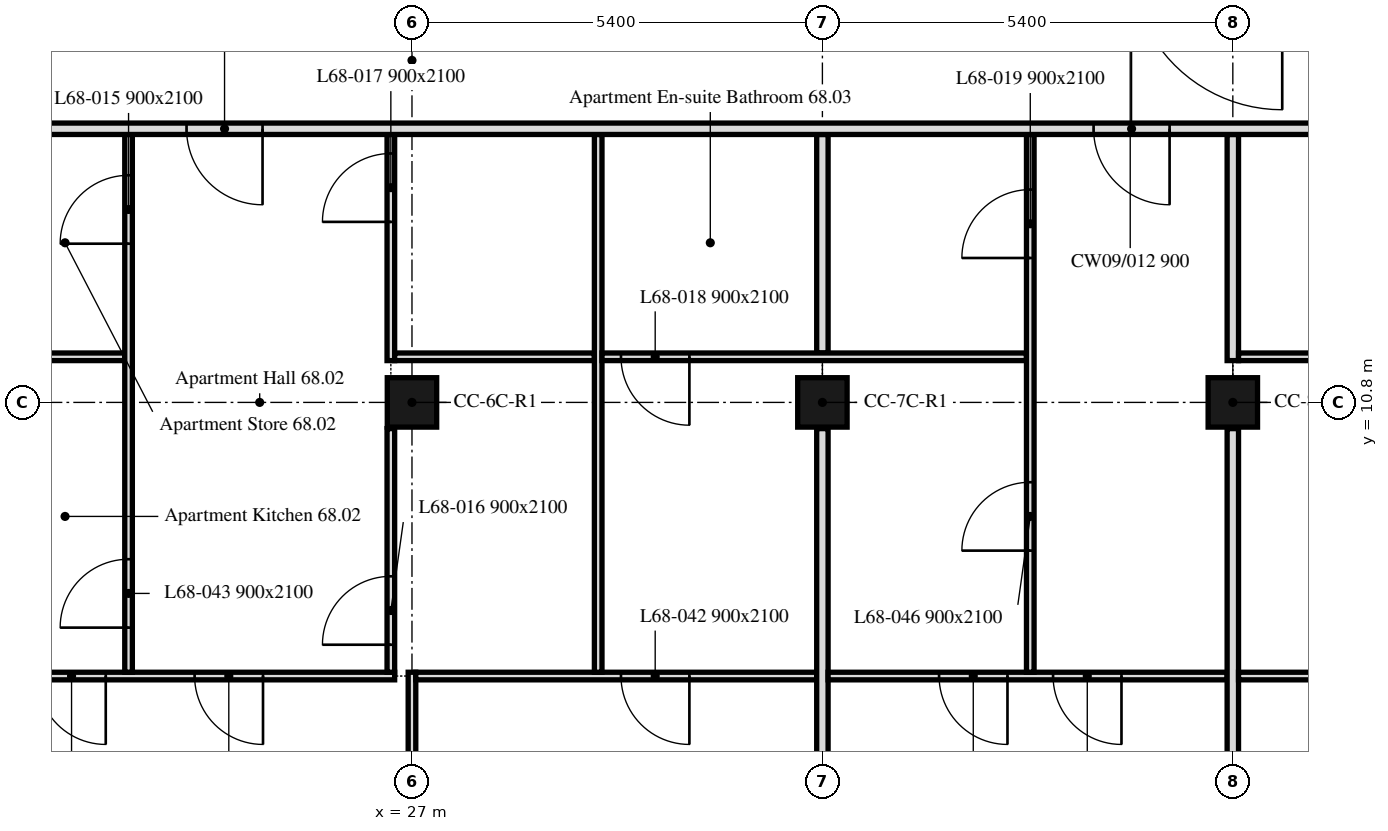
"""IFC4 building model, lengths in metres.
Left out: names, types, materials, properties, quantities, classifications, styles, units other than length and angle.
Written with IfcOpenShell. Run it as: python <this file> out.ifc"""

import sys

from ifc_helpers import new_model, si_unit, direction, frame, frame_2d, origin, origin_2d, place, context, subcontext, project, spatial, rectangle, extrude, element, fill, save


model = new_model("IFC4")
c1 = context("Model", 3, precision=1e-05, world=origin(), true_north=direction((0.0, 1.0)))
c2 = subcontext(c1, "Body", "Model", "MODEL_VIEW")
j1 = project(units=[si_unit("LENGTHUNIT", "METRE"), si_unit("PLANEANGLEUNIT", "RADIAN")], contexts=[c1])
p1 = place(None, origin())
s1 = spatial("IfcSite", under=j1, at=p1, CompositionType="ELEMENT")
p2 = place(p1, origin())
s2 = spatial("IfcBuilding", under=s1, at=p2, CompositionType="ELEMENT")
p3 = place(p2, frame((0.0, 0.0, 278.5)))
s3 = spatial("IfcBuildingStorey", under=s2, at=p3, CompositionType="ELEMENT", Elevation=278.5)
for number, where, z_axis, x_axis in (
    (1, (27.0, 10.8, 0.0), (0.0, 0.0, 1.0), (1.0, 0.0, 0.0)),
    (2, (32.4, 10.8, 0.0), (0.0, 0.0, 1.0), (1.0, 0.0, 0.0)),
    (3, (37.8, 10.8, 0.0), (0.0, 0.0, 1.0), (1.0, 0.0, 0.0)),
):
    element("IfcColumn", number, at=place(p3, frame(where, z_axis=z_axis, x_axis=x_axis)), inside=s3, PredefinedType="COLUMN", context=c2, shape_type="SweptSolid", body=[
        extrude(rectangle(XDim=0.65, YDim=0.65, at=origin_2d()), origin(), (0.0, 0.0, 1.0), 3.0),
    ])
p4 = place(p3, frame((27.0, 5.745, 0.0), z_axis=(0.0, 0.0, 1.0), x_axis=(0.0, 1.0, 0.0)))
e4 = element("IfcWall", 4, at=p4, inside=s3, PredefinedType="PARTITIONING", context=c2, shape_type="SweptSolid", body=[
    extrude(rectangle(XDim=1.505, YDim=0.1, at=frame_2d((0.752, 0.0))), origin(), (0.0, 0.0, 1.0), 2.4),
])
p5 = place(p3, frame((26.772, 7.2, 0.0), z_axis=(0.0, 0.0, 1.0), x_axis=(-1.0, 0.0, 0.0)))
e5 = element("IfcWall", 5, at=p5, inside=s3, PredefinedType="PARTITIONING", context=c2, shape_type="SweptSolid", body=[
    extrude(rectangle(XDim=5.097, YDim=0.1, at=frame_2d((2.548, 0.0))), origin(), (0.0, 0.0, 1.0), 3.0),
])
p6 = place(p5, frame((3.801, 0.0, 0.0)))
e6 = element("IfcOpeningElement", 6, at=p6, cuts=e5, PredefinedType="OPENING", context=c2, shape_type="SweptSolid", body=[
    extrude(rectangle(XDim=0.9, YDim=2.1, at=frame_2d((0.45, 1.05))), frame((0.0, 0.05, 0.0), z_axis=(0.0, -1.0, 0.0), x_axis=(1.0, 0.0, 0.0)), (0.0, 0.0, 1.0), 0.1),
])
p7 = place(p5, frame((1.732, 0.0, 0.0)))
e7 = element("IfcOpeningElement", 7, at=p7, cuts=e5, PredefinedType="OPENING", context=c2, shape_type="SweptSolid", body=[
    extrude(rectangle(XDim=0.9, YDim=2.1, at=frame_2d((0.45, 1.05))), frame((0.0, 0.05, 0.0), z_axis=(0.0, -1.0, 0.0), x_axis=(1.0, 0.0, 0.0)), (0.0, 0.0, 1.0), 0.1),
])
p8 = place(p3, frame((32.325, 7.2, 0.0), z_axis=(0.0, 0.0, 1.0), x_axis=(-1.0, 0.0, 0.0)))
e8 = element("IfcWall", 8, at=p8, inside=s3, PredefinedType="PARTITIONING", context=c2, shape_type="SweptSolid", body=[
    extrude(rectangle(XDim=5.275, YDim=0.1, at=frame_2d((2.637, 0.0))), origin(), (0.0, 0.0, 1.0), 3.0),
])
p9 = place(p8, frame((1.675, 0.0, 0.0)))
e9 = element("IfcOpeningElement", 9, at=p9, cuts=e8, PredefinedType="OPENING", context=c2, shape_type="SweptSolid", body=[
    extrude(rectangle(XDim=0.9, YDim=2.1, at=frame_2d((0.45, 1.05))), frame((0.0, 0.05, 0.0), z_axis=(0.0, -1.0, 0.0), x_axis=(1.0, 0.0, 0.0)), (0.0, 0.0, 1.0), 0.1),
])
p10 = place(p3, frame((23.221, 11.4, 0.0), z_axis=(0.0, 0.0, 1.0), x_axis=(-1.0, 0.0, 0.0)))
e10 = element("IfcWall", 10, at=p10, inside=s3, PredefinedType="PARTITIONING", context=c2, shape_type="SweptSolid", body=[
    extrude(rectangle(XDim=3.641, YDim=0.1, at=frame_2d((1.82, 0.0))), origin(), (0.0, 0.0, 1.0), 2.4),
])
p11 = place(p10, frame((2.491, 0.0, 0.0)))
e11 = element("IfcOpeningElement", 11, at=p11, cuts=e10, PredefinedType="OPENING", context=c2, shape_type="SweptSolid", body=[
    extrude(rectangle(XDim=0.9, YDim=2.1, at=frame_2d((0.45, 1.05))), frame((0.0, 0.05, 0.0), z_axis=(0.0, -1.0, 0.0), x_axis=(1.0, 0.0, 0.0)), (0.0, 0.0, 1.0), 0.1),
])
p12 = place(p3, frame((23.271, 7.25, 0.0), z_axis=(0.0, 0.0, 1.0), x_axis=(0.0, 1.0, 0.0)))
e12 = element("IfcWall", 12, at=p12, inside=s3, PredefinedType="PARTITIONING", context=c2, shape_type="SweptSolid", body=[
    extrude(rectangle(XDim=7.075, YDim=0.1, at=frame_2d((3.538, 0.0))), origin(), (0.0, 0.0, 1.0), 3.0),
])
p13 = place(p12, frame((5.638, 0.0, 0.0)))
e13 = element("IfcOpeningElement", 13, at=p13, cuts=e12, PredefinedType="OPENING", context=c2, shape_type="SweptSolid", body=[
    extrude(rectangle(XDim=0.9, YDim=2.1, at=frame_2d((0.45, 1.05))), frame((0.0, 0.05, 0.0), z_axis=(0.0, -1.0, 0.0), x_axis=(1.0, 0.0, 0.0)), (0.0, 0.0, 1.0), 0.1),
])
p14 = place(p12, frame((0.587, 0.0, 0.0)))
e14 = element("IfcOpeningElement", 14, at=p14, cuts=e12, PredefinedType="OPENING", context=c2, shape_type="SweptSolid", body=[
    extrude(rectangle(XDim=0.9, YDim=2.1, at=frame_2d((0.45, 1.05))), frame((0.0, 0.05, 0.0), z_axis=(0.0, -1.0, 0.0), x_axis=(1.0, 0.0, 0.0)), (0.0, 0.0, 1.0), 0.1),
])
p15 = place(p3, frame((26.722, 7.25, 0.0), z_axis=(0.0, 0.0, 1.0), x_axis=(0.0, 1.0, 0.0)))
e15 = element("IfcWall", 15, at=p15, inside=s3, PredefinedType="PARTITIONING", context=c2, shape_type="SweptSolid", body=[
    extrude(rectangle(XDim=3.205, YDim=0.1, at=frame_2d((1.603, 0.0))), origin(), (0.0, 0.0, 1.0), 3.0),
])
p16 = place(p15, frame((0.362, 0.0, 0.0)))
e16 = element("IfcOpeningElement", 16, at=p16, cuts=e15, PredefinedType="OPENING", context=c2, shape_type="SweptSolid", body=[
    extrude(rectangle(XDim=0.9, YDim=2.1, at=frame_2d((0.45, 1.05))), frame((0.0, 0.05, 0.0), z_axis=(0.0, -1.0, 0.0), x_axis=(1.0, 0.0, 0.0)), (0.0, 0.0, 1.0), 0.1),
])
p17 = place(p3, frame((26.722, 11.35, 0.0), z_axis=(0.0, 0.0, 1.0), x_axis=(0.0, 1.0, 0.0)))
e17 = element("IfcWall", 17, at=p17, inside=s3, PredefinedType="PARTITIONING", context=c2, shape_type="SweptSolid", body=[
    extrude(rectangle(XDim=2.975, YDim=0.1, at=frame_2d((1.487, 0.0))), origin(), (0.0, 0.0, 1.0), 3.0),
])
p18 = place(p17, frame((1.825, 0.0, 0.0)))
e18 = element("IfcOpeningElement", 18, at=p18, cuts=e17, PredefinedType="OPENING", context=c2, shape_type="SweptSolid", body=[
    extrude(rectangle(XDim=0.9, YDim=2.1, at=frame_2d((0.45, 1.05))), frame((0.0, 0.05, 0.0), z_axis=(0.0, -1.0, 0.0), x_axis=(1.0, 0.0, 0.0)), (0.0, 0.0, 1.0), 0.1),
])
p19 = place(p3, frame((29.4, 11.4, 0.0), z_axis=(0.0, 0.0, 1.0), x_axis=(-1.0, 0.0, 0.0)))
e19 = element("IfcWall", 19, at=p19, inside=s3, PredefinedType="PARTITIONING", context=c2, shape_type="SweptSolid", body=[
    extrude(rectangle(XDim=2.628, YDim=0.1, at=frame_2d((1.314, 0.0))), origin(), (0.0, 0.0, 1.0), 2.4),
])
p20 = place(p3, frame((29.45, 7.25, 0.0), z_axis=(0.0, 0.0, 1.0), x_axis=(0.0, 1.0, 0.0)))
e20 = element("IfcWall", 20, at=p20, inside=s3, PredefinedType="PARTITIONING", context=c2, shape_type="SweptSolid", body=[
    extrude(rectangle(XDim=7.075, YDim=0.1, at=frame_2d((3.538, 0.0))), origin(), (0.0, 0.0, 1.0), 3.0),
])
p21 = place(p3, frame((32.4, 5.745, 0.0), z_axis=(0.0, 0.0, 1.0), x_axis=(0.0, 1.0, 0.0)))
e21 = element("IfcWall", 21, at=p21, inside=s3, PredefinedType="PARTITIONING", context=c2, shape_type="SweptSolid", body=[
    extrude(rectangle(XDim=4.71, YDim=0.15, at=frame_2d((2.355, 0.0))), origin(), (0.0, 0.0, 1.0), 2.4),
])
p22 = place(p3, frame((32.4, 11.45, 0.0), z_axis=(0.0, 0.0, 1.0), x_axis=(0.0, 1.0, 0.0)))
e22 = element("IfcWall", 22, at=p22, inside=s3, PredefinedType="PARTITIONING", context=c2, shape_type="SweptSolid", body=[
    extrude(rectangle(XDim=2.875, YDim=0.15, at=frame_2d((1.438, 0.0))), origin(), (0.0, 0.0, 1.0), 2.4),
])
p23 = place(p3, frame((37.725, 7.2, 0.0), z_axis=(0.0, 0.0, 1.0), x_axis=(-1.0, 0.0, 0.0)))
e23 = element("IfcWall", 23, at=p23, inside=s3, PredefinedType="PARTITIONING", context=c2, shape_type="SweptSolid", body=[
    extrude(rectangle(XDim=5.25, YDim=0.1, at=frame_2d((2.625, 0.0))), origin(), (0.0, 0.0, 1.0), 3.0),
])
p24 = place(p23, frame((2.89, 0.0, 0.0)))
e24 = element("IfcOpeningElement", 24, at=p24, cuts=e23, PredefinedType="OPENING", context=c2, shape_type="SweptSolid", body=[
    extrude(rectangle(XDim=0.9, YDim=2.1, at=frame_2d((0.45, 1.05))), frame((0.0, 0.05, 0.0), z_axis=(0.0, -1.0, 0.0), x_axis=(1.0, 0.0, 0.0)), (0.0, 0.0, 1.0), 0.1),
])
p25 = place(p23, frame((1.39, 0.0, 0.0)))
e25 = element("IfcOpeningElement", 25, at=p25, cuts=e23, PredefinedType="OPENING", context=c2, shape_type="SweptSolid", body=[
    extrude(rectangle(XDim=0.9, YDim=2.1, at=frame_2d((0.45, 1.05))), frame((0.0, 0.05, 0.0), z_axis=(0.0, -1.0, 0.0), x_axis=(1.0, 0.0, 0.0)), (0.0, 0.0, 1.0), 0.1),
])
p26 = place(p3, frame((35.085, 11.4, 0.0), z_axis=(0.0, 0.0, 1.0), x_axis=(-1.0, 0.0, 0.0)))
e26 = element("IfcWall", 26, at=p26, inside=s3, PredefinedType="PARTITIONING", context=c2, shape_type="SweptSolid", body=[
    extrude(rectangle(XDim=5.585, YDim=0.1, at=frame_2d((2.792, 0.0))), origin(), (0.0, 0.0, 1.0), 2.4),
])
p27 = place(p26, frame((4.435, 0.0, 0.0)))
e27 = element("IfcOpeningElement", 27, at=p27, cuts=e26, PredefinedType="OPENING", context=c2, shape_type="SweptSolid", body=[
    extrude(rectangle(XDim=0.9, YDim=2.1, at=frame_2d((0.45, 1.05))), frame((0.0, 0.05, 0.0), z_axis=(0.0, -1.0, 0.0), x_axis=(1.0, 0.0, 0.0)), (0.0, 0.0, 1.0), 0.1),
])
p28 = place(p3, frame((35.135, 7.25, 0.0), z_axis=(0.0, 0.0, 1.0), x_axis=(0.0, 1.0, 0.0)))
e28 = element("IfcWall", 28, at=p28, inside=s3, PredefinedType="PARTITIONING", context=c2, shape_type="SweptSolid", body=[
    extrude(rectangle(XDim=7.075, YDim=0.1, at=frame_2d((3.538, 0.0))), origin(), (0.0, 0.0, 1.0), 2.4),
])
p29 = place(p28, frame((5.45, 0.0, 0.0)))
e29 = element("IfcOpeningElement", 29, at=p29, cuts=e28, PredefinedType="OPENING", context=c2, shape_type="SweptSolid", body=[
    extrude(rectangle(XDim=0.9, YDim=2.1, at=frame_2d((0.45, 1.05))), frame((0.0, 0.05, 0.0), z_axis=(0.0, -1.0, 0.0), x_axis=(1.0, 0.0, 0.0)), (0.0, 0.0, 1.0), 0.1),
])
p30 = place(p28, frame((1.6, 0.0, 0.0)))
e30 = element("IfcOpeningElement", 30, at=p30, cuts=e28, PredefinedType="OPENING", context=c2, shape_type="SweptSolid", body=[
    extrude(rectangle(XDim=0.9, YDim=2.1, at=frame_2d((0.45, 1.05))), frame((0.0, 0.05, 0.0), z_axis=(0.0, -1.0, 0.0), x_axis=(1.0, 0.0, 0.0)), (0.0, 0.0, 1.0), 0.1),
])
p31 = place(p3, frame((37.8, 5.745, 0.0), z_axis=(0.0, 0.0, 1.0), x_axis=(0.0, 1.0, 0.0)))
e31 = element("IfcWall", 31, at=p31, inside=s3, PredefinedType="PARTITIONING", context=c2, shape_type="SweptSolid", body=[
    extrude(rectangle(XDim=4.71, YDim=0.15, at=frame_2d((2.355, 0.0))), origin(), (0.0, 0.0, 1.0), 2.4),
])
p32 = place(p3, frame((37.8, 11.35, 0.0), z_axis=(0.0, 0.0, 1.0), x_axis=(0.0, 1.0, 0.0)))
e32 = element("IfcWall", 32, at=p32, inside=s3, PredefinedType="PARTITIONING", context=c2, shape_type="SweptSolid", body=[
    extrude(rectangle(XDim=2.975, YDim=0.15, at=frame_2d((1.487, 0.0))), origin(), (0.0, 0.0, 1.0), 2.4),
])
p33 = place(p3, frame((47.849, 7.2, 0.0), z_axis=(0.0, 0.0, 1.0), x_axis=(-1.0, 0.0, 0.0)))
e33 = element("IfcWall", 33, at=p33, inside=s3, PredefinedType="PARTITIONING", context=c2, shape_type="SweptSolid", body=[
    extrude(rectangle(XDim=9.974, YDim=0.1, at=frame_2d((4.987, 0.0))), origin(), (0.0, 0.0, 1.0), 3.0),
])
p34 = place(p33, frame((7.555, 0.0, 0.0)))
e34 = element("IfcOpeningElement", 34, at=p34, cuts=e33, PredefinedType="OPENING", context=c2, shape_type="SweptSolid", body=[
    extrude(rectangle(XDim=0.9, YDim=2.1, at=frame_2d((0.45, 1.05))), frame((0.0, 0.05, 0.0), z_axis=(0.0, -1.0, 0.0), x_axis=(1.0, 0.0, 0.0)), (0.0, 0.0, 1.0), 0.1),
])
p35 = place(p33, frame((5.502, 0.0, 0.0)))
e35 = element("IfcOpeningElement", 35, at=p35, cuts=e33, PredefinedType="OPENING", context=c2, shape_type="SweptSolid", body=[
    extrude(rectangle(XDim=0.9, YDim=2.1, at=frame_2d((0.45, 1.05))), frame((0.0, 0.05, 0.0), z_axis=(0.0, -1.0, 0.0), x_axis=(1.0, 0.0, 0.0)), (0.0, 0.0, 1.0), 0.1),
])
p36 = place(p33, frame((0.25, 0.0, 0.0)))
e36 = element("IfcOpeningElement", 36, at=p36, cuts=e33, PredefinedType="OPENING", context=c2, shape_type="SweptSolid", body=[
    extrude(rectangle(XDim=0.8, YDim=2.1, at=frame_2d((0.4, 1.05))), frame((0.0, 0.05, 0.0), z_axis=(0.0, -1.0, 0.0), x_axis=(1.0, 0.0, 0.0)), (0.0, 0.0, 1.0), 0.1),
])
p37 = place(p3, frame((40.544, 11.4, 0.0), z_axis=(0.0, 0.0, 1.0), x_axis=(-1.0, 0.0, 0.0)))
e37 = element("IfcWall", 37, at=p37, inside=s3, PredefinedType="PARTITIONING", context=c2, shape_type="SweptSolid", body=[
    extrude(rectangle(XDim=2.669, YDim=0.1, at=frame_2d((1.334, 0.0))), origin(), (0.0, 0.0, 1.0), 3.0),
])
p38 = place(p3, frame((47.849, 14.4, 0.0), z_axis=(0.0, 0.0, 1.0), x_axis=(-1.0, 0.0, 0.0)))
e38 = element("IfcWall", 38, at=p38, inside=s3, PredefinedType="PARTITIONING", context=c2, shape_type="SweptSolid", body=[
    extrude(rectangle(XDim=41.698, YDim=0.15, at=frame_2d((20.849, 0.0))), origin(), (0.0, 0.0, 1.0), 2.4),
])
p39 = place(p38, frame((10.881, 0.0, 0.0)))
e39 = element("IfcOpeningElement", 39, at=p39, cuts=e38, PredefinedType="OPENING", context=c2, shape_type="SweptSolid", body=[
    extrude(rectangle(XDim=1.0, YDim=2.1, at=frame_2d((0.5, 1.05))), frame((0.0, 0.075, 0.0), z_axis=(0.0, -1.0, 0.0), x_axis=(1.0, 0.0, 0.0)), (0.0, 0.0, 1.0), 0.15),
])
p40 = place(p38, frame((37.759, 0.0, 0.0)))
e40 = element("IfcOpeningElement", 40, at=p40, cuts=e38, PredefinedType="OPENING", context=c2, shape_type="SweptSolid", body=[
    extrude(rectangle(XDim=1.0, YDim=2.1, at=frame_2d((0.5, 1.05))), frame((0.0, 0.075, 0.0), z_axis=(0.0, -1.0, 0.0), x_axis=(1.0, 0.0, 0.0)), (0.0, 0.0, 1.0), 0.15),
])
p41 = place(p38, frame((22.815, 0.0, 0.0)))
e41 = element("IfcOpeningElement", 41, at=p41, cuts=e38, PredefinedType="OPENING", context=c2, shape_type="SweptSolid", body=[
    extrude(rectangle(XDim=1.0, YDim=2.1, at=frame_2d((0.5, 1.05))), frame((0.0, 0.075, 0.0), z_axis=(0.0, -1.0, 0.0), x_axis=(1.0, 0.0, 0.0)), (0.0, 0.0, 1.0), 0.15),
])
p42 = place(p38, frame((4.85, 0.0, 0.0)))
e42 = element("IfcOpeningElement", 42, at=p42, cuts=e38, PredefinedType="OPENING", context=c2, shape_type="SweptSolid", body=[
    extrude(rectangle(XDim=1.0, YDim=2.1, at=frame_2d((0.5, 1.05))), frame((0.0, 0.075, 0.0), z_axis=(0.0, -1.0, 0.0), x_axis=(1.0, 0.0, 0.0)), (0.0, 0.0, 1.0), 0.15),
])
p43 = place(p13, origin())
e43 = element("IfcDoor", 43, at=p43, inside=s3, OperationType="SINGLE_SWING_LEFT", PredefinedType="DOOR", context=c2, shape_type="SweptSolid", body=[
    extrude(rectangle(XDim=0.9, YDim=2.1, at=frame_2d((0.45, 1.05))), frame((0.0, 0.025, 0.0), z_axis=(0.0, -1.0, 0.0), x_axis=(1.0, 0.0, 0.0)), (0.0, 0.0, 1.0), 0.05),
])
fill(e13, e43)
p44 = place(p16, origin())
e44 = element("IfcDoor", 44, at=p44, inside=s3, OperationType="SINGLE_SWING_RIGHT", PredefinedType="DOOR", context=c2, shape_type="SweptSolid", body=[
    extrude(rectangle(XDim=0.9, YDim=2.1, at=frame_2d((0.45, 1.05))), frame((0.0, 0.025, 0.0), z_axis=(0.0, -1.0, 0.0), x_axis=(1.0, 0.0, 0.0)), (0.0, 0.0, 1.0), 0.05),
])
fill(e16, e44)
p45 = place(p18, origin())
e45 = element("IfcDoor", 45, at=p45, inside=s3, OperationType="SINGLE_SWING_RIGHT", PredefinedType="DOOR", context=c2, shape_type="SweptSolid", body=[
    extrude(rectangle(XDim=0.9, YDim=2.1, at=frame_2d((0.45, 1.05))), frame((0.0, 0.025, 0.0), z_axis=(0.0, -1.0, 0.0), x_axis=(1.0, 0.0, 0.0)), (0.0, 0.0, 1.0), 0.05),
])
fill(e18, e45)
p46 = place(p27, origin())
e46 = element("IfcDoor", 46, at=p46, inside=s3, OperationType="SINGLE_SWING_RIGHT", PredefinedType="DOOR", context=c2, shape_type="SweptSolid", body=[
    extrude(rectangle(XDim=0.9, YDim=2.1, at=frame_2d((0.45, 1.05))), frame((0.0, 0.025, 0.0), z_axis=(0.0, -1.0, 0.0), x_axis=(1.0, 0.0, 0.0)), (0.0, 0.0, 1.0), 0.05),
])
fill(e27, e46)
p47 = place(p29, origin())
e47 = element("IfcDoor", 47, at=p47, inside=s3, OperationType="SINGLE_SWING_RIGHT", PredefinedType="DOOR", context=c2, shape_type="SweptSolid", body=[
    extrude(rectangle(XDim=0.9, YDim=2.1, at=frame_2d((0.45, 1.05))), frame((0.0, 0.025, 0.0), z_axis=(0.0, -1.0, 0.0), x_axis=(1.0, 0.0, 0.0)), (0.0, 0.0, 1.0), 0.05),
])
fill(e29, e47)
p48 = place(p6, origin())
e48 = element("IfcDoor", 48, at=p48, inside=s3, OperationType="SINGLE_SWING_RIGHT", PredefinedType="DOOR", context=c2, shape_type="SweptSolid", body=[
    extrude(rectangle(XDim=0.9, YDim=2.1, at=frame_2d((0.45, 1.05))), frame((0.0, 0.025, 0.0), z_axis=(0.0, -1.0, 0.0), x_axis=(1.0, 0.0, 0.0)), (0.0, 0.0, 1.0), 0.05),
])
fill(e6, e48)
p49 = place(p9, origin())
e49 = element("IfcDoor", 49, at=p49, inside=s3, OperationType="SINGLE_SWING_LEFT", PredefinedType="DOOR", context=c2, shape_type="SweptSolid", body=[
    extrude(rectangle(XDim=0.9, YDim=2.1, at=frame_2d((0.45, 1.05))), frame((0.0, 0.025, 0.0), z_axis=(0.0, -1.0, 0.0), x_axis=(1.0, 0.0, 0.0)), (0.0, 0.0, 1.0), 0.05),
])
fill(e9, e49)
p50 = place(p14, origin())
e50 = element("IfcDoor", 50, at=p50, inside=s3, OperationType="SINGLE_SWING_RIGHT", PredefinedType="DOOR", context=c2, shape_type="SweptSolid", body=[
    extrude(rectangle(XDim=0.9, YDim=2.1, at=frame_2d((0.45, 1.05))), frame((0.0, 0.025, 0.0), z_axis=(0.0, -1.0, 0.0), x_axis=(1.0, 0.0, 0.0)), (0.0, 0.0, 1.0), 0.05),
])
fill(e14, e50)
p51 = place(p24, origin())
e51 = element("IfcDoor", 51, at=p51, inside=s3, OperationType="SINGLE_SWING_RIGHT", PredefinedType="DOOR", context=c2, shape_type="SweptSolid", body=[
    extrude(rectangle(XDim=0.9, YDim=2.1, at=frame_2d((0.45, 1.05))), frame((0.0, 0.025, 0.0), z_axis=(0.0, -1.0, 0.0), x_axis=(1.0, 0.0, 0.0)), (0.0, 0.0, 1.0), 0.05),
])
fill(e24, e51)
p52 = place(p25, origin())
e52 = element("IfcDoor", 52, at=p52, inside=s3, OperationType="SINGLE_SWING_LEFT", PredefinedType="DOOR", context=c2, shape_type="SweptSolid", body=[
    extrude(rectangle(XDim=0.9, YDim=2.1, at=frame_2d((0.45, 1.05))), frame((0.0, 0.025, 0.0), z_axis=(0.0, -1.0, 0.0), x_axis=(1.0, 0.0, 0.0)), (0.0, 0.0, 1.0), 0.05),
])
fill(e25, e52)
p53 = place(p30, origin())
e53 = element("IfcDoor", 53, at=p53, inside=s3, OperationType="SINGLE_SWING_LEFT", PredefinedType="DOOR", context=c2, shape_type="SweptSolid", body=[
    extrude(rectangle(XDim=0.9, YDim=2.1, at=frame_2d((0.45, 1.05))), frame((0.0, 0.025, 0.0), z_axis=(0.0, -1.0, 0.0), x_axis=(1.0, 0.0, 0.0)), (0.0, 0.0, 1.0), 0.05),
])
fill(e30, e53)
p54 = place(p7, origin())
e54 = element("IfcDoor", 54, at=p54, inside=s3, OperationType="SINGLE_SWING_LEFT", PredefinedType="DOOR", context=c2, shape_type="SweptSolid", body=[
    extrude(rectangle(XDim=0.9, YDim=2.1, at=frame_2d((0.45, 1.05))), frame((0.0, 0.025, 0.0), z_axis=(0.0, -1.0, 0.0), x_axis=(1.0, 0.0, 0.0)), (0.0, 0.0, 1.0), 0.05),
])
fill(e7, e54)
p55 = place(p39, origin())
e55 = element("IfcDoor", 55, at=p55, inside=s3, OperationType="SINGLE_SWING_RIGHT", PredefinedType="DOOR", context=c2, shape_type="SweptSolid", body=[
    extrude(rectangle(XDim=1.0, YDim=2.1, at=frame_2d((0.5, 1.05))), frame((0.0, 0.025, 0.0), z_axis=(0.0, -1.0, 0.0), x_axis=(1.0, 0.0, 0.0)), (0.0, 0.0, 1.0), 0.05),
])
fill(e39, e55)
p56 = place(p41, origin())
e56 = element("IfcDoor", 56, at=p56, inside=s3, OperationType="SINGLE_SWING_LEFT", PredefinedType="DOOR", context=c2, shape_type="SweptSolid", body=[
    extrude(rectangle(XDim=1.0, YDim=2.1, at=frame_2d((0.5, 1.05))), frame((0.0, 0.025, 0.0), z_axis=(0.0, -1.0, 0.0), x_axis=(1.0, 0.0, 0.0)), (0.0, 0.0, 1.0), 0.05),
])
fill(e41, e56)
save(model, sys.argv[1])
